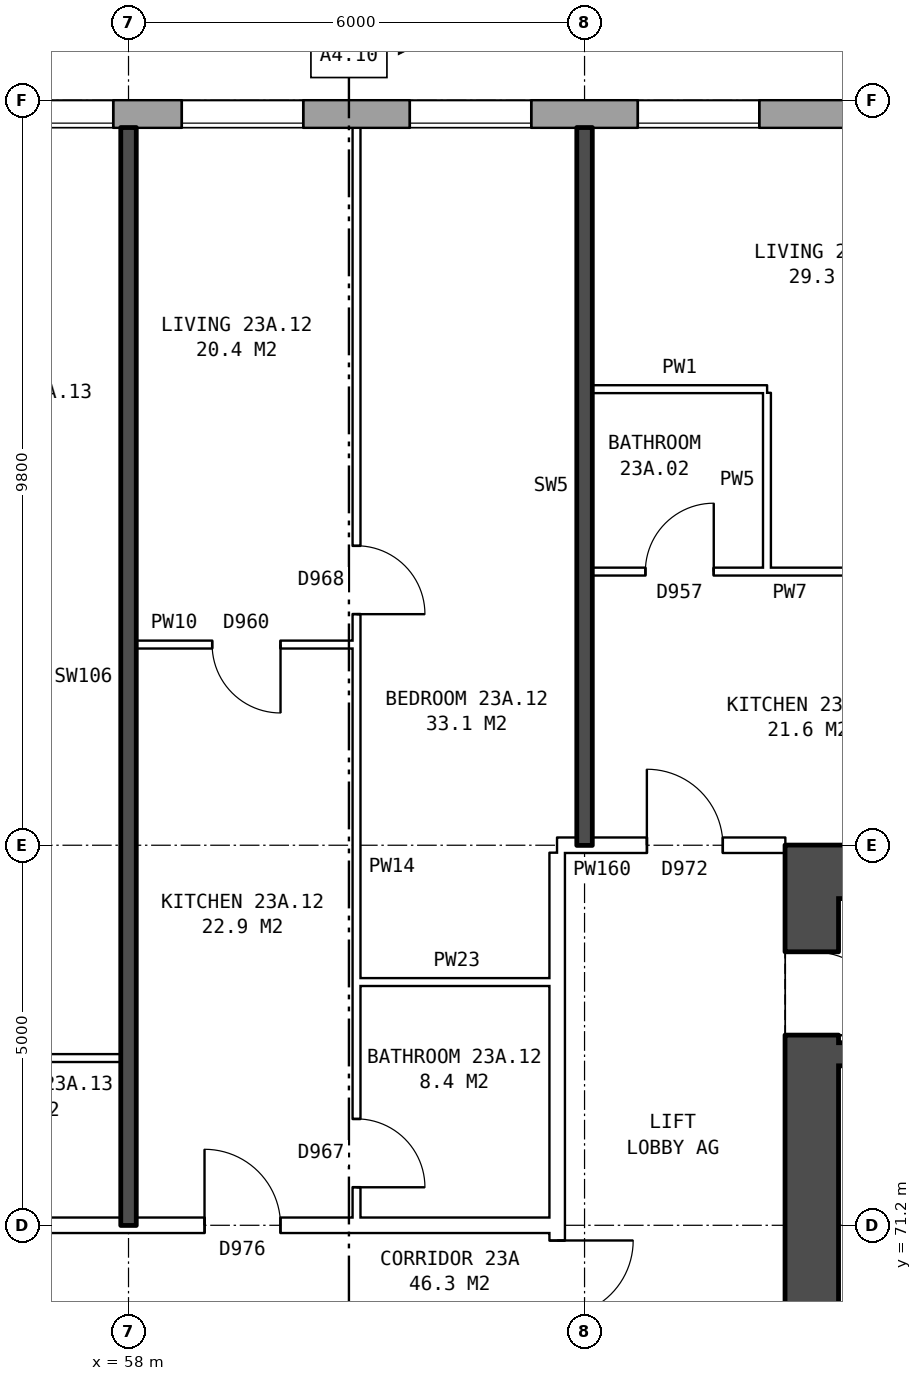
"""IFC4 building model, lengths in metres.
Left out: names, types, materials, properties, quantities, classifications, styles, units other than length and angle.
Written with IfcOpenShell. Run it as: python <this file> out.ifc"""

import sys

from ifc_helpers import new_model, si_unit, direction, frame, frame_2d, origin, place, context, subcontext, project, spatial, rectangle, extrude, element, fill, save


model = new_model("IFC4")
c1 = context("Model", 3, precision=1e-05, world=origin(), true_north=direction((0.0, 1.0)))
c2 = subcontext(c1, "Body", "Model", "MODEL_VIEW")
j1 = project(units=[si_unit("LENGTHUNIT", "METRE"), si_unit("PLANEANGLEUNIT", "RADIAN")], contexts=[c1])
p1 = place(None, origin())
s1 = spatial("IfcSite", under=j1, at=p1, CompositionType="ELEMENT")
p2 = place(p1, origin())
s2 = spatial("IfcBuilding", under=s1, at=p2, CompositionType="ELEMENT")
p3 = place(p2, frame((0.0, 0.0, 84.0)))
s3 = spatial("IfcBuildingStorey", under=s2, at=p3, CompositionType="ELEMENT", Elevation=84.0)
p4 = place(p3, frame((72.925, 85.82, 0.0), z_axis=(0.0, 0.0, 1.0), x_axis=(-1.0, 0.0, 0.0)))
e1 = element("IfcWall", 1, at=p4, inside=s3, PredefinedType="STANDARD", context=c2, shape_type="SweptSolid", body=[
    extrude(rectangle(XDim=46.601, YDim=0.36, at=frame_2d((23.3, 0.0))), origin(), (0.0, 0.0, 1.0), 2.85),
])
p5 = place(p4, frame((0.625, 0.0, 0.8)))
e2 = element("IfcOpeningElement", 2, at=p5, cuts=e1, PredefinedType="OPENING", context=c2, shape_type="SweptSolid", body=[
    extrude(rectangle(XDim=1.6, YDim=1.8, at=frame_2d((0.8, 0.9))), frame((0.0, 0.19, 0.0), z_axis=(0.0, -1.0, 0.0), x_axis=(1.0, 0.0, 0.0)), (0.0, 0.0, 1.0), 0.38),
])
p6 = place(p4, frame((3.625, 0.0, 0.8)))
e3 = element("IfcOpeningElement", 3, at=p6, cuts=e1, PredefinedType="OPENING", context=c2, shape_type="SweptSolid", body=[
    extrude(rectangle(XDim=1.6, YDim=1.8, at=frame_2d((0.8, 0.9))), frame((0.0, 0.19, 0.0), z_axis=(0.0, -1.0, 0.0), x_axis=(1.0, 0.0, 0.0)), (0.0, 0.0, 1.0), 0.38),
])
p7 = place(p4, frame((6.625, 0.0, 0.8)))
e4 = element("IfcOpeningElement", 4, at=p7, cuts=e1, PredefinedType="OPENING", context=c2, shape_type="SweptSolid", body=[
    extrude(rectangle(XDim=1.6, YDim=1.8, at=frame_2d((0.8, 0.9))), frame((0.0, 0.19, 0.0), z_axis=(0.0, -1.0, 0.0), x_axis=(1.0, 0.0, 0.0)), (0.0, 0.0, 1.0), 0.38),
])
p8 = place(p4, frame((9.625, 0.0, 0.8)))
e5 = element("IfcOpeningElement", 5, at=p8, cuts=e1, PredefinedType="OPENING", context=c2, shape_type="SweptSolid", body=[
    extrude(rectangle(XDim=1.6, YDim=1.8, at=frame_2d((0.8, 0.9))), frame((0.0, 0.19, 0.0), z_axis=(0.0, -1.0, 0.0), x_axis=(1.0, 0.0, 0.0)), (0.0, 0.0, 1.0), 0.38),
])
p9 = place(p4, frame((12.625, 0.0, 0.8)))
e6 = element("IfcOpeningElement", 6, at=p9, cuts=e1, PredefinedType="OPENING", context=c2, shape_type="SweptSolid", body=[
    extrude(rectangle(XDim=1.6, YDim=1.8, at=frame_2d((0.8, 0.9))), frame((0.0, 0.19, 0.0), z_axis=(0.0, -1.0, 0.0), x_axis=(1.0, 0.0, 0.0)), (0.0, 0.0, 1.0), 0.38),
])
p10 = place(p4, frame((15.125, 0.0, 0.8)))
e7 = element("IfcOpeningElement", 7, at=p10, cuts=e1, PredefinedType="OPENING", context=c2, shape_type="SweptSolid", body=[
    extrude(rectangle(XDim=1.6, YDim=1.8, at=frame_2d((0.8, 0.9))), frame((0.0, 0.19, 0.0), z_axis=(0.0, -1.0, 0.0), x_axis=(1.0, 0.0, 0.0)), (0.0, 0.0, 1.0), 0.38),
])
p11 = place(p4, frame((18.625, 0.0, 0.35)))
e8 = element("IfcOpeningElement", 8, at=p11, cuts=e1, PredefinedType="OPENING", context=c2, shape_type="SweptSolid", body=[
    extrude(rectangle(XDim=0.8, YDim=0.9, at=frame_2d((0.4, 0.45))), frame((0.0, 0.19, 0.0), z_axis=(0.0, -1.0, 0.0), x_axis=(1.0, 0.0, 0.0)), (0.0, 0.0, 1.0), 0.38),
])
p12 = place(p4, frame((21.625, 0.0, 0.8)))
e9 = element("IfcOpeningElement", 9, at=p12, cuts=e1, PredefinedType="OPENING", context=c2, shape_type="SweptSolid", body=[
    extrude(rectangle(XDim=1.6, YDim=1.8, at=frame_2d((0.8, 0.9))), frame((0.0, 0.19, 0.0), z_axis=(0.0, -1.0, 0.0), x_axis=(1.0, 0.0, 0.0)), (0.0, 0.0, 1.0), 0.38),
])
p13 = place(p4, frame((24.625, 0.0, 0.8)))
e10 = element("IfcOpeningElement", 10, at=p13, cuts=e1, PredefinedType="OPENING", context=c2, shape_type="SweptSolid", body=[
    extrude(rectangle(XDim=1.6, YDim=1.8, at=frame_2d((0.8, 0.9))), frame((0.0, 0.19, 0.0), z_axis=(0.0, -1.0, 0.0), x_axis=(1.0, 0.0, 0.0)), (0.0, 0.0, 1.0), 0.38),
])
p14 = place(p4, frame((29.075, 0.0, 1.4)))
e11 = element("IfcOpeningElement", 11, at=p14, cuts=e1, PredefinedType="OPENING", context=c2, shape_type="SweptSolid", body=[
    extrude(rectangle(XDim=1.2, YDim=1.2, at=frame_2d((0.6, 0.6))), frame((0.0, 0.19, 0.0), z_axis=(0.0, -1.0, 0.0), x_axis=(1.0, 0.0, 0.0)), (0.0, 0.0, 1.0), 0.38),
])
p15 = place(p4, frame((30.625, 0.0, 0.8)))
e12 = element("IfcOpeningElement", 12, at=p15, cuts=e1, PredefinedType="OPENING", context=c2, shape_type="SweptSolid", body=[
    extrude(rectangle(XDim=1.6, YDim=1.8, at=frame_2d((0.8, 0.9))), frame((0.0, 0.19, 0.0), z_axis=(0.0, -1.0, 0.0), x_axis=(1.0, 0.0, 0.0)), (0.0, 0.0, 1.0), 0.38),
])
p16 = place(p4, frame((33.625, 0.0, 0.8)))
e13 = element("IfcOpeningElement", 13, at=p16, cuts=e1, PredefinedType="OPENING", context=c2, shape_type="SweptSolid", body=[
    extrude(rectangle(XDim=1.6, YDim=1.8, at=frame_2d((0.8, 0.9))), frame((0.0, 0.19, 0.0), z_axis=(0.0, -1.0, 0.0), x_axis=(1.0, 0.0, 0.0)), (0.0, 0.0, 1.0), 0.38),
])
p17 = place(p4, frame((36.625, 0.0, 0.8)))
e14 = element("IfcOpeningElement", 14, at=p17, cuts=e1, PredefinedType="OPENING", context=c2, shape_type="SweptSolid", body=[
    extrude(rectangle(XDim=1.6, YDim=1.8, at=frame_2d((0.8, 0.9))), frame((0.0, 0.19, 0.0), z_axis=(0.0, -1.0, 0.0), x_axis=(1.0, 0.0, 0.0)), (0.0, 0.0, 1.0), 0.38),
])
p18 = place(p4, frame((39.625, 0.0, 0.8)))
e15 = element("IfcOpeningElement", 15, at=p18, cuts=e1, PredefinedType="OPENING", context=c2, shape_type="SweptSolid", body=[
    extrude(rectangle(XDim=1.6, YDim=1.8, at=frame_2d((0.8, 0.9))), frame((0.0, 0.19, 0.0), z_axis=(0.0, -1.0, 0.0), x_axis=(1.0, 0.0, 0.0)), (0.0, 0.0, 1.0), 0.38),
])
p19 = place(p4, frame((42.625, 0.0, 0.8)))
e16 = element("IfcOpeningElement", 16, at=p19, cuts=e1, PredefinedType="OPENING", context=c2, shape_type="SweptSolid", body=[
    extrude(rectangle(XDim=1.6, YDim=1.8, at=frame_2d((0.8, 0.9))), frame((0.0, 0.19, 0.0), z_axis=(0.0, -1.0, 0.0), x_axis=(1.0, 0.0, 0.0)), (0.0, 0.0, 1.0), 0.38),
])
p20 = place(p4, frame((17.025, 0.0, 1.5)))
e17 = element("IfcOpeningElement", 17, at=p20, cuts=e1, PredefinedType="OPENING", context=c2, shape_type="SweptSolid", body=[
    extrude(rectangle(XDim=0.6, YDim=0.9, at=frame_2d((0.3, 0.45))), frame((0.0, 0.19, 0.0), z_axis=(0.0, -1.0, 0.0), x_axis=(1.0, 0.0, 0.0)), (0.0, 0.0, 1.0), 0.38),
])
p21 = place(p4, frame((19.725, 0.0, 0.35)))
e18 = element("IfcOpeningElement", 18, at=p21, cuts=e1, PredefinedType="OPENING", context=c2, shape_type="SweptSolid", body=[
    extrude(rectangle(XDim=1.0, YDim=1.8, at=frame_2d((0.5, 0.9))), frame((0.0, 0.19, 0.0), z_axis=(0.0, -1.0, 0.0), x_axis=(1.0, 0.0, 0.0)), (0.0, 0.0, 1.0), 0.38),
])
p22 = place(p3, frame((66.99, 64.5, 0.0), z_axis=(0.0, 0.0, 1.0), x_axis=(0.0, 1.0, 0.0)))
e19 = element("IfcWall", 19, at=p22, inside=s3, PredefinedType="SHEAR", context=c2, shape_type="SweptSolid", body=[
    extrude(rectangle(XDim=11.0, YDim=0.7, at=frame_2d((5.5, 0.0))), origin(), (0.0, 0.0, 1.0), 2.85),
])
p23 = place(p22, frame((0.625, 0.0, 0.0)))
e20 = element("IfcOpeningElement", 20, at=p23, cuts=e19, PredefinedType="OPENING", context=c2, shape_type="SweptSolid", body=[
    extrude(rectangle(XDim=1.1, YDim=2.1, at=frame_2d((0.55, 1.05))), frame((0.0, 0.36, 0.0), z_axis=(0.0, -1.0, 0.0), x_axis=(1.0, 0.0, 0.0)), (0.0, 0.0, 1.0), 0.72),
])
p24 = place(p22, frame((9.2, 0.0, 0.0)))
e21 = element("IfcOpeningElement", 21, at=p24, cuts=e19, PredefinedType="OPENING", context=c2, shape_type="SweptSolid", body=[
    extrude(rectangle(XDim=1.1, YDim=2.1, at=frame_2d((0.55, 1.05))), frame((0.0, 0.36, 0.0), z_axis=(0.0, -1.0, 0.0), x_axis=(1.0, 0.0, 0.0)), (0.0, 0.0, 1.0), 0.72),
])
p25 = place(p3, frame((66.64, 75.85, 0.0), z_axis=(0.0, 0.0, 1.0), x_axis=(1.0, 0.0, 0.0)))
e22 = element("IfcWall", 22, at=p25, inside=s3, PredefinedType="SHEAR", context=c2, shape_type="SweptSolid", body=[
    extrude(rectangle(XDim=9.0, YDim=0.7, at=frame_2d((4.5, 0.0))), origin(), (0.0, 0.0, 1.0), 2.85),
])
p26 = place(p3, frame((67.34, 73.45, 0.0), z_axis=(0.0, 0.0, 1.0), x_axis=(1.0, 0.0, 0.0)))
e23 = element("IfcWall", 23, at=p26, inside=s3, PredefinedType="SHEAR", context=c2, shape_type="SweptSolid", body=[
    extrude(rectangle(XDim=2.2, YDim=0.3, at=frame_2d((1.1, 0.0))), origin(), (0.0, 0.0, 1.0), 2.85),
])
p27 = place(p3, frame((63.64, 63.9, 0.0), z_axis=(0.0, 0.0, 1.0), x_axis=(0.0, 1.0, 0.0)))
e24 = element("IfcWall", 24, at=p27, inside=s3, PredefinedType="PARTITIONING", context=c2, shape_type="SweptSolid", body=[
    extrude(rectangle(XDim=12.2, YDim=0.2, at=frame_2d((6.1, 0.0))), origin(), (0.0, 0.0, 1.0), 2.85),
])
p28 = place(p27, frame((5.1, 0.0, 0.0)))
e25 = element("IfcOpeningElement", 25, at=p28, cuts=e24, PredefinedType="OPENING", context=c2, shape_type="SweptSolid", body=[
    extrude(rectangle(XDim=2.0, YDim=2.1, at=frame_2d((1.0, 1.05))), frame((0.0, 0.11, 0.0), z_axis=(0.0, -1.0, 0.0), x_axis=(1.0, 0.0, 0.0)), (0.0, 0.0, 1.0), 0.22),
])
p29 = place(p3, frame((44.36, 71.2, 0.0), z_axis=(0.0, 0.0, 1.0), x_axis=(1.0, 0.0, 0.0)))
e26 = element("IfcWall", 26, at=p29, inside=s3, PredefinedType="PARTITIONING", context=c2, shape_type="SweptSolid", body=[
    extrude(rectangle(XDim=19.28, YDim=0.2, at=frame_2d((9.64, 0.0))), origin(), (0.0, 0.0, 1.0), 2.85),
])
p30 = place(p29, frame((14.64, 0.0, 0.0)))
e27 = element("IfcOpeningElement", 27, at=p30, cuts=e26, PredefinedType="OPENING", context=c2, shape_type="SweptSolid", body=[
    extrude(rectangle(XDim=1.0, YDim=2.1, at=frame_2d((0.5, 1.05))), frame((0.0, 0.11, 0.0), z_axis=(0.0, -1.0, 0.0), x_axis=(1.0, 0.0, 0.0)), (0.0, 0.0, 1.0), 0.22),
])
p31 = place(p29, frame((8.64, 0.0, 0.0)))
e28 = element("IfcOpeningElement", 28, at=p31, cuts=e26, PredefinedType="OPENING", context=c2, shape_type="SweptSolid", body=[
    extrude(rectangle(XDim=1.0, YDim=2.1, at=frame_2d((0.5, 1.05))), frame((0.0, 0.11, 0.0), z_axis=(0.0, -1.0, 0.0), x_axis=(1.0, 0.0, 0.0)), (0.0, 0.0, 1.0), 0.22),
])
p32 = place(p29, frame((2.64, 0.0, 0.0)))
e29 = element("IfcOpeningElement", 29, at=p32, cuts=e26, PredefinedType="OPENING", context=c2, shape_type="SweptSolid", body=[
    extrude(rectangle(XDim=1.0, YDim=2.1, at=frame_2d((0.5, 1.05))), frame((0.0, 0.11, 0.0), z_axis=(0.0, -1.0, 0.0), x_axis=(1.0, 0.0, 0.0)), (0.0, 0.0, 1.0), 0.22),
])
p33 = place(p3, frame((55.0, 73.4, 0.0), z_axis=(0.0, 0.0, 1.0), x_axis=(1.0, 0.0, 0.0)))
e30 = element("IfcWall", 30, at=p33, inside=s3, PredefinedType="PARTITIONING", context=c2, shape_type="SweptSolid", body=[
    extrude(rectangle(XDim=2.9, YDim=0.1, at=frame_2d((1.45, 0.0))), origin(), (0.0, 0.0, 1.0), 2.85),
])
p34 = place(p3, frame((61.0, 74.4, 0.0), z_axis=(0.0, 0.0, 1.0), x_axis=(1.0, 0.0, 0.0)))
e31 = element("IfcWall", 31, at=p34, inside=s3, PredefinedType="PARTITIONING", context=c2, shape_type="SweptSolid", body=[
    extrude(rectangle(XDim=2.64, YDim=0.1, at=frame_2d((1.32, 0.0))), origin(), (0.0, 0.0, 1.0), 2.85),
])
p35 = place(p3, frame((63.64, 76.2, 0.0), z_axis=(0.0, 0.0, 1.0), x_axis=(1.0, 0.0, 0.0)))
e32 = element("IfcWall", 32, at=p35, inside=s3, PredefinedType="PARTITIONING", context=c2, shape_type="SweptSolid", body=[
    extrude(rectangle(XDim=3.0, YDim=0.2, at=frame_2d((1.5, 0.0))), origin(), (0.0, 0.0, 1.0), 2.85),
])
p36 = place(p35, frame((1.18, 0.0, 0.0)))
e33 = element("IfcOpeningElement", 33, at=p36, cuts=e32, PredefinedType="OPENING", context=c2, shape_type="SweptSolid", body=[
    extrude(rectangle(XDim=1.0, YDim=2.1, at=frame_2d((0.5, 1.05))), frame((0.0, 0.11, 0.0), z_axis=(0.0, -1.0, 0.0), x_axis=(1.0, 0.0, 0.0)), (0.0, 0.0, 1.0), 0.22),
])
p37 = place(p3, frame((58.1, 78.84, 0.0), z_axis=(0.0, 0.0, 1.0), x_axis=(1.0, 0.0, 0.0)))
e34 = element("IfcWall", 34, at=p37, inside=s3, PredefinedType="PARTITIONING", context=c2, shape_type="SweptSolid", body=[
    extrude(rectangle(XDim=2.9, YDim=0.1, at=frame_2d((1.45, 0.0))), origin(), (0.0, 0.0, 1.0), 2.85),
])
p38 = place(p37, frame((1.0, 0.0, 0.0)))
e35 = element("IfcOpeningElement", 35, at=p38, cuts=e34, PredefinedType="OPENING", context=c2, shape_type="SweptSolid", body=[
    extrude(rectangle(XDim=0.9, YDim=2.1, at=frame_2d((0.45, 1.05))), frame((0.0, 0.06, 0.0), z_axis=(0.0, -1.0, 0.0), x_axis=(1.0, 0.0, 0.0)), (0.0, 0.0, 1.0), 0.12),
])
p39 = place(p3, frame((64.1, 79.8, 0.0), z_axis=(0.0, 0.0, 1.0), x_axis=(1.0, 0.0, 0.0)))
e36 = element("IfcWall", 36, at=p39, inside=s3, PredefinedType="PARTITIONING", context=c2, shape_type="SweptSolid", body=[
    extrude(rectangle(XDim=5.8, YDim=0.1, at=frame_2d((2.9, 0.0))), origin(), (0.0, 0.0, 1.0), 2.85),
])
p40 = place(p39, frame((3.6, 0.0, 0.0)))
e37 = element("IfcOpeningElement", 37, at=p40, cuts=e36, PredefinedType="OPENING", context=c2, shape_type="SweptSolid", body=[
    extrude(rectangle(XDim=0.9, YDim=2.1, at=frame_2d((0.45, 1.05))), frame((0.0, 0.06, 0.0), z_axis=(0.0, -1.0, 0.0), x_axis=(1.0, 0.0, 0.0)), (0.0, 0.0, 1.0), 0.12),
])
p41 = place(p39, frame((0.7, 0.0, 0.0)))
e38 = element("IfcOpeningElement", 38, at=p41, cuts=e36, PredefinedType="OPENING", context=c2, shape_type="SweptSolid", body=[
    extrude(rectangle(XDim=0.9, YDim=2.1, at=frame_2d((0.45, 1.05))), frame((0.0, 0.06, 0.0), z_axis=(0.0, -1.0, 0.0), x_axis=(1.0, 0.0, 0.0)), (0.0, 0.0, 1.0), 0.12),
])
p42 = place(p3, frame((64.1, 82.2, 0.0), z_axis=(0.0, 0.0, 1.0), x_axis=(1.0, 0.0, 0.0)))
e39 = element("IfcWall", 39, at=p42, inside=s3, PredefinedType="PARTITIONING", context=c2, shape_type="SweptSolid", body=[
    extrude(rectangle(XDim=2.3, YDim=0.1, at=frame_2d((1.15, 0.0))), origin(), (0.0, 0.0, 1.0), 2.85),
])
p43 = place(p3, frame((58.0, 71.2, 0.0), z_axis=(0.0, 0.0, 1.0), x_axis=(0.0, 1.0, 0.0)))
e40 = element("IfcWall", 40, at=p43, inside=s3, PredefinedType="SOLIDWALL", context=c2, shape_type="SweptSolid", body=[
    extrude(rectangle(XDim=14.44, YDim=0.2, at=frame_2d((7.22, 0.0))), origin(), (0.0, 0.0, 1.0), 2.85),
])
p44 = place(p3, frame((61.0, 71.3, 0.0), z_axis=(0.0, 0.0, 1.0), x_axis=(0.0, 1.0, 0.0)))
e41 = element("IfcWall", 41, at=p44, inside=s3, PredefinedType="PARTITIONING", context=c2, shape_type="SweptSolid", body=[
    extrude(rectangle(XDim=14.34, YDim=0.1, at=frame_2d((7.17, 0.0))), origin(), (0.0, 0.0, 1.0), 2.85),
])
p45 = place(p44, frame((7.94, 0.0, 0.0)))
e42 = element("IfcOpeningElement", 42, at=p45, cuts=e41, PredefinedType="OPENING", context=c2, shape_type="SweptSolid", body=[
    extrude(rectangle(XDim=0.9, YDim=2.1, at=frame_2d((0.45, 1.05))), frame((0.0, 0.06, 0.0), z_axis=(0.0, -1.0, 0.0), x_axis=(1.0, 0.0, 0.0)), (0.0, 0.0, 1.0), 0.12),
])
p46 = place(p44, frame((0.4, 0.0, 0.0)))
e43 = element("IfcOpeningElement", 43, at=p46, cuts=e41, PredefinedType="OPENING", context=c2, shape_type="SweptSolid", body=[
    extrude(rectangle(XDim=0.9, YDim=2.1, at=frame_2d((0.45, 1.05))), frame((0.0, 0.06, 0.0), z_axis=(0.0, -1.0, 0.0), x_axis=(1.0, 0.0, 0.0)), (0.0, 0.0, 1.0), 0.12),
])
p47 = place(p3, frame((64.0, 76.2, 0.0), z_axis=(0.0, 0.0, 1.0), x_axis=(0.0, 1.0, 0.0)))
e44 = element("IfcWall", 44, at=p47, inside=s3, PredefinedType="SOLIDWALL", context=c2, shape_type="SweptSolid", body=[
    extrude(rectangle(XDim=9.44, YDim=0.2, at=frame_2d((4.72, 0.0))), origin(), (0.0, 0.0, 1.0), 2.85),
])
p48 = place(p3, frame((66.4, 79.85, 0.0), z_axis=(0.0, 0.0, 1.0), x_axis=(0.0, 1.0, 0.0)))
e45 = element("IfcWall", 45, at=p48, inside=s3, PredefinedType="PARTITIONING", context=c2, shape_type="SweptSolid", body=[
    extrude(rectangle(XDim=2.3, YDim=0.1, at=frame_2d((1.15, 0.0))), origin(), (0.0, 0.0, 1.0), 2.85),
])
p49 = place(p7, origin())
e46 = element("IfcWindow", 46, at=p49, inside=s3, PartitioningType="SINGLE_PANEL", PredefinedType="WINDOW", context=c2, shape_type="SweptSolid", body=[
    extrude(rectangle(XDim=1.6, YDim=1.8, at=frame_2d((0.8, 0.9))), frame((0.0, 0.15, 0.0), z_axis=(0.0, -1.0, 0.0), x_axis=(1.0, 0.0, 0.0)), (0.0, 0.0, 1.0), 0.06),
])
fill(e4, e46)
p50 = place(p8, origin())
e47 = element("IfcWindow", 47, at=p50, inside=s3, PartitioningType="SINGLE_PANEL", PredefinedType="WINDOW", context=c2, shape_type="SweptSolid", body=[
    extrude(rectangle(XDim=1.6, YDim=1.8, at=frame_2d((0.8, 0.9))), frame((0.0, 0.15, 0.0), z_axis=(0.0, -1.0, 0.0), x_axis=(1.0, 0.0, 0.0)), (0.0, 0.0, 1.0), 0.06),
])
fill(e5, e47)
p51 = place(p9, origin())
e48 = element("IfcWindow", 48, at=p51, inside=s3, PartitioningType="SINGLE_PANEL", PredefinedType="WINDOW", context=c2, shape_type="SweptSolid", body=[
    extrude(rectangle(XDim=1.6, YDim=1.8, at=frame_2d((0.8, 0.9))), frame((0.0, 0.15, 0.0), z_axis=(0.0, -1.0, 0.0), x_axis=(1.0, 0.0, 0.0)), (0.0, 0.0, 1.0), 0.06),
])
fill(e6, e48)
p52 = place(p10, origin())
e49 = element("IfcWindow", 49, at=p52, inside=s3, PartitioningType="SINGLE_PANEL", PredefinedType="WINDOW", context=c2, shape_type="SweptSolid", body=[
    extrude(rectangle(XDim=1.6, YDim=1.8, at=frame_2d((0.8, 0.9))), frame((0.0, 0.15, 0.0), z_axis=(0.0, -1.0, 0.0), x_axis=(1.0, 0.0, 0.0)), (0.0, 0.0, 1.0), 0.06),
])
fill(e7, e49)
p53 = place(p24, frame((1.1, 0.0, 0.0), z_axis=(0.0, 0.0, 1.0), x_axis=(-1.0, 0.0, 0.0)))
e50 = element("IfcDoor", 50, at=p53, inside=s3, OperationType="SINGLE_SWING_RIGHT", PredefinedType="DOOR", context=c2, shape_type="SweptSolid", body=[
    extrude(rectangle(XDim=1.1, YDim=2.1, at=frame_2d((0.55, 1.05))), frame((0.0, 0.335, 0.0), z_axis=(0.0, -1.0, 0.0), x_axis=(1.0, 0.0, 0.0)), (0.0, 0.0, 1.0), 0.05),
])
fill(e21, e50)
p54 = place(p28, frame((2.0, 0.0, 0.0), z_axis=(0.0, 0.0, 1.0), x_axis=(-1.0, 0.0, 0.0)))
e51 = element("IfcDoor", 51, at=p54, inside=s3, OperationType="DOUBLE_DOOR_SINGLE_SWING", PredefinedType="DOOR", context=c2, shape_type="SweptSolid", body=[
    extrude(rectangle(XDim=2.0, YDim=2.1, at=frame_2d((1.0, 1.05))), frame((0.0, 0.025, 0.0), z_axis=(0.0, -1.0, 0.0), x_axis=(1.0, 0.0, 0.0)), (0.0, 0.0, 1.0), 0.05),
])
fill(e25, e51)
p55 = place(p36, origin())
e52 = element("IfcDoor", 52, at=p55, inside=s3, OperationType="SINGLE_SWING_LEFT", PredefinedType="DOOR", context=c2, shape_type="SweptSolid", body=[
    extrude(rectangle(XDim=1.0, YDim=2.1, at=frame_2d((0.5, 1.05))), frame((0.0, 0.025, 0.0), z_axis=(0.0, -1.0, 0.0), x_axis=(1.0, 0.0, 0.0)), (0.0, 0.0, 1.0), 0.05),
])
fill(e33, e52)
p56 = place(p41, origin())
e53 = element("IfcDoor", 53, at=p56, inside=s3, OperationType="SINGLE_SWING_RIGHT", PredefinedType="DOOR", context=c2, shape_type="SweptSolid", body=[
    extrude(rectangle(XDim=0.9, YDim=2.1, at=frame_2d((0.45, 1.05))), frame((0.0, 0.025, 0.0), z_axis=(0.0, -1.0, 0.0), x_axis=(1.0, 0.0, 0.0)), (0.0, 0.0, 1.0), 0.05),
])
fill(e38, e53)
p57 = place(p45, frame((0.9, 0.0, 0.0), z_axis=(0.0, 0.0, 1.0), x_axis=(-1.0, 0.0, 0.0)))
e54 = element("IfcDoor", 54, at=p57, inside=s3, OperationType="SINGLE_SWING_RIGHT", PredefinedType="DOOR", context=c2, shape_type="SweptSolid", body=[
    extrude(rectangle(XDim=0.9, YDim=2.1, at=frame_2d((0.45, 1.05))), frame((0.0, 0.025, 0.0), z_axis=(0.0, -1.0, 0.0), x_axis=(1.0, 0.0, 0.0)), (0.0, 0.0, 1.0), 0.05),
])
fill(e42, e54)
p58 = place(p30, origin())
e55 = element("IfcDoor", 55, at=p58, inside=s3, OperationType="SINGLE_SWING_LEFT", PredefinedType="DOOR", context=c2, shape_type="SweptSolid", body=[
    extrude(rectangle(XDim=1.0, YDim=2.1, at=frame_2d((0.5, 1.05))), frame((0.0, 0.025, 0.0), z_axis=(0.0, -1.0, 0.0), x_axis=(1.0, 0.0, 0.0)), (0.0, 0.0, 1.0), 0.05),
])
fill(e27, e55)
p59 = place(p38, frame((0.9, 0.0, 0.0), z_axis=(0.0, 0.0, 1.0), x_axis=(-1.0, 0.0, 0.0)))
e56 = element("IfcDoor", 56, at=p59, inside=s3, OperationType="SINGLE_SWING_LEFT", PredefinedType="DOOR", context=c2, shape_type="SweptSolid", body=[
    extrude(rectangle(XDim=0.9, YDim=2.1, at=frame_2d((0.45, 1.05))), frame((0.0, 0.025, 0.0), z_axis=(0.0, -1.0, 0.0), x_axis=(1.0, 0.0, 0.0)), (0.0, 0.0, 1.0), 0.05),
])
fill(e35, e56)
p60 = place(p46, frame((0.9, 0.0, 0.0), z_axis=(0.0, 0.0, 1.0), x_axis=(-1.0, 0.0, 0.0)))
e57 = element("IfcDoor", 57, at=p60, inside=s3, OperationType="SINGLE_SWING_RIGHT", PredefinedType="DOOR", context=c2, shape_type="SweptSolid", body=[
    extrude(rectangle(XDim=0.9, YDim=2.1, at=frame_2d((0.45, 1.05))), frame((0.0, 0.025, 0.0), z_axis=(0.0, -1.0, 0.0), x_axis=(1.0, 0.0, 0.0)), (0.0, 0.0, 1.0), 0.05),
])
fill(e43, e57)
save(model, sys.argv[1])
